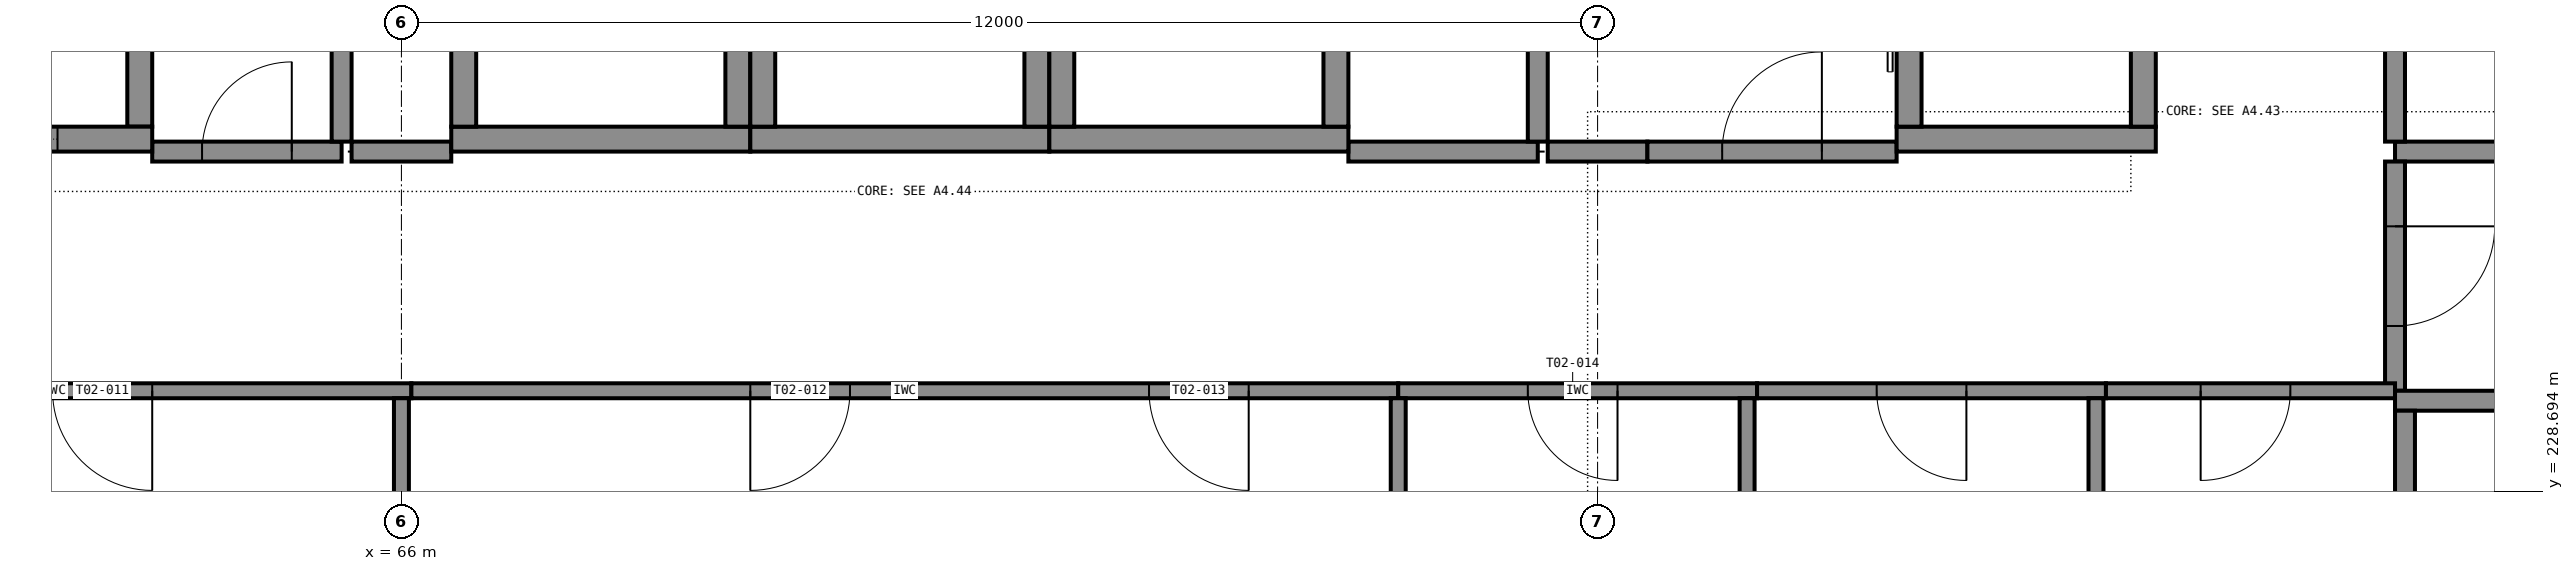
"""IFC4 building model, lengths in metres.
Left out: names, types, materials, properties, quantities, classifications, styles, units other than length and angle.
Written with IfcOpenShell. Run it as: python <this file> out.ifc"""

import sys

from ifc_helpers import new_model, si_unit, direction, frame, frame_2d, origin, place, context, subcontext, project, spatial, rectangle, extrude, element, fill, save


model = new_model("IFC4")
c1 = context("Model", 3, precision=1e-05, world=origin(), true_north=direction((0.0, 1.0)))
c2 = subcontext(c1, "Body", "Model", "MODEL_VIEW")
j1 = project(units=[si_unit("LENGTHUNIT", "METRE"), si_unit("PLANEANGLEUNIT", "RADIAN")], contexts=[c1])
p1 = place(None, origin())
s1 = spatial("IfcSite", under=j1, at=p1, CompositionType="ELEMENT")
p2 = place(p1, origin())
s2 = spatial("IfcBuilding", under=s1, at=p2, CompositionType="ELEMENT")
p3 = place(p2, frame((0.0, 0.0, 12.0)))
s3 = spatial("IfcBuildingStorey", under=s2, at=p3, CompositionType="ELEMENT", Elevation=12.0)
p4 = place(p3, frame((60.5, 232.225, 0.0), z_axis=(0.0, 0.0, 1.0), x_axis=(1.0, 0.0, 0.0)))
e1 = element("IfcWall", 1, at=p4, inside=s3, PredefinedType="SHEAR", context=c2, shape_type="SweptSolid", body=[
    extrude(rectangle(XDim=3.0, YDim=0.25, at=frame_2d((1.5, 0.0))), origin(), (0.0, 0.0, 1.0), 5.0),
])
p5 = place(p4, frame((0.95, 0.0, 0.0)))
e2 = element("IfcOpeningElement", 2, at=p5, cuts=e1, PredefinedType="OPENING", context=c2, shape_type="SweptSolid", body=[
    extrude(rectangle(XDim=1.1, YDim=2.1, at=frame_2d((0.55, 1.05))), frame((0.0, 0.135, 0.0), z_axis=(0.0, -1.0, 0.0), x_axis=(1.0, 0.0, 0.0)), (0.0, 0.0, 1.0), 0.27),
])
p6 = place(p3, frame((63.375, 232.35, 0.0), z_axis=(0.0, 0.0, 1.0), x_axis=(0.0, 1.0, 0.0)))
e3 = element("IfcWall", 3, at=p6, inside=s3, PredefinedType="SHEAR", context=c2, shape_type="SweptSolid", body=[
    extrude(rectangle(XDim=3.3, YDim=0.25, at=frame_2d((1.65, 0.0))), origin(), (0.0, 0.0, 1.0), 5.0),
])
p7 = place(p3, frame((66.5, 232.225, 0.0), z_axis=(0.0, 0.0, 1.0), x_axis=(1.0, 0.0, 0.0)))
e4 = element("IfcWall", 4, at=p7, inside=s3, PredefinedType="SHEAR", context=c2, shape_type="SweptSolid", body=[
    extrude(rectangle(XDim=3.0, YDim=0.25, at=frame_2d((1.5, 0.0))), origin(), (0.0, 0.0, 1.0), 5.0),
])
for number, where, z_axis, x_axis in (
    (5, (66.625, 232.35, 0.0), (0.0, 0.0, 1.0), (0.0, 1.0, 0.0)),
    (6, (69.375, 232.35, 0.0), (0.0, 0.0, 1.0), (0.0, 1.0, 0.0)),
):
    element("IfcWall", number, at=place(p3, frame(where, z_axis=z_axis, x_axis=x_axis)), inside=s3, PredefinedType="SHEAR", context=c2, shape_type="SweptSolid", body=[
        extrude(rectangle(XDim=3.3, YDim=0.25, at=frame_2d((1.65, 0.0))), origin(), (0.0, 0.0, 1.0), 5.0),
    ])
p8 = place(p3, frame((69.5, 232.225, 0.0), z_axis=(0.0, 0.0, 1.0), x_axis=(1.0, 0.0, 0.0)))
e7 = element("IfcWall", 7, at=p8, inside=s3, PredefinedType="SHEAR", context=c2, shape_type="SweptSolid", body=[
    extrude(rectangle(XDim=3.0, YDim=0.25, at=frame_2d((1.5, 0.0))), origin(), (0.0, 0.0, 1.0), 5.0),
])
for number, where, z_axis, x_axis in (
    (8, (69.625, 232.35, 0.0), (0.0, 0.0, 1.0), (0.0, 1.0, 0.0)),
    (9, (72.375, 232.35, 0.0), (0.0, 0.0, 1.0), (0.0, 1.0, 0.0)),
):
    element("IfcWall", number, at=place(p3, frame(where, z_axis=z_axis, x_axis=x_axis)), inside=s3, PredefinedType="SHEAR", context=c2, shape_type="SweptSolid", body=[
        extrude(rectangle(XDim=3.3, YDim=0.25, at=frame_2d((1.65, 0.0))), origin(), (0.0, 0.0, 1.0), 5.0),
    ])
p9 = place(p3, frame((72.5, 232.225, 0.0), z_axis=(0.0, 0.0, 1.0), x_axis=(1.0, 0.0, 0.0)))
e10 = element("IfcWall", 10, at=p9, inside=s3, PredefinedType="SHEAR", context=c2, shape_type="SweptSolid", body=[
    extrude(rectangle(XDim=3.0, YDim=0.25, at=frame_2d((1.5, 0.0))), origin(), (0.0, 0.0, 1.0), 5.0),
])
for number, where, z_axis, x_axis in (
    (11, (72.625, 232.35, 0.0), (0.0, 0.0, 1.0), (0.0, 1.0, 0.0)),
    (12, (75.375, 232.35, 0.0), (0.0, 0.0, 1.0), (0.0, 1.0, 0.0)),
):
    element("IfcWall", number, at=place(p3, frame(where, z_axis=z_axis, x_axis=x_axis)), inside=s3, PredefinedType="SHEAR", context=c2, shape_type="SweptSolid", body=[
        extrude(rectangle(XDim=3.3, YDim=0.25, at=frame_2d((1.65, 0.0))), origin(), (0.0, 0.0, 1.0), 5.0),
    ])
p10 = place(p3, frame((81.0, 232.225, 0.0), z_axis=(0.0, 0.0, 1.0), x_axis=(1.0, 0.0, 0.0)))
e13 = element("IfcWall", 13, at=p10, inside=s3, PredefinedType="SHEAR", context=c2, shape_type="SweptSolid", body=[
    extrude(rectangle(XDim=2.6, YDim=0.25, at=frame_2d((1.3, 0.0))), origin(), (0.0, 0.0, 1.0), 5.0),
])
p11 = place(p3, frame((81.125, 232.35, 0.0), z_axis=(0.0, 0.0, 1.0), x_axis=(0.0, 1.0, 0.0)))
e14 = element("IfcWall", 14, at=p11, inside=s3, PredefinedType="SHEAR", context=c2, shape_type="SweptSolid", body=[
    extrude(rectangle(XDim=3.3, YDim=0.25, at=frame_2d((1.65, 0.0))), origin(), (0.0, 0.0, 1.0), 5.0),
])
p12 = place(p11, frame((1.1, 0.0, 0.0)))
e15 = element("IfcOpeningElement", 15, at=p12, cuts=e14, PredefinedType="OPENING", context=c2, shape_type="SweptSolid", body=[
    extrude(rectangle(XDim=1.1, YDim=2.1, at=frame_2d((0.55, 1.05))), frame((0.0, 0.135, 0.0), z_axis=(0.0, -1.0, 0.0), x_axis=(1.0, 0.0, 0.0)), (0.0, 0.0, 1.0), 0.27),
])
p13 = place(p3, frame((83.475, 232.35, 0.0), z_axis=(0.0, 0.0, 1.0), x_axis=(0.0, 1.0, 0.0)))
e16 = element("IfcWall", 16, at=p13, inside=s3, PredefinedType="SHEAR", context=c2, shape_type="SweptSolid", body=[
    extrude(rectangle(XDim=3.3, YDim=0.25, at=frame_2d((1.65, 0.0))), origin(), (0.0, 0.0, 1.0), 5.0),
])
p14 = place(p3, frame((89.5, 229.6, 0.0), z_axis=(0.0, 0.0, 1.0), x_axis=(-1.0, 0.0, 0.0)))
e17 = element("IfcWall", 17, at=p14, inside=s3, PredefinedType="SHEAR", context=c2, shape_type="SweptSolid", body=[
    extrude(rectangle(XDim=3.5, YDim=0.2, at=frame_2d((1.75, 0.0))), origin(), (0.0, 0.0, 1.0), 5.0),
])
p15 = place(p14, frame((1.15, 0.0, 0.0)))
e18 = element("IfcOpeningElement", 18, at=p15, cuts=e17, PredefinedType="OPENING", context=c2, shape_type="SweptSolid", body=[
    extrude(rectangle(XDim=1.2, YDim=2.1, at=frame_2d((0.6, 1.05))), frame((0.0, 0.11, 0.0), z_axis=(0.0, -1.0, 0.0), x_axis=(1.0, 0.0, 0.0)), (0.0, 0.0, 1.0), 0.22),
])
p16 = place(p3, frame((86.1, 222.0, 0.0), z_axis=(0.0, 0.0, 1.0), x_axis=(0.0, 1.0, 0.0)))
e19 = element("IfcWall", 19, at=p16, inside=s3, PredefinedType="SHEAR", context=c2, shape_type="SweptSolid", body=[
    extrude(rectangle(XDim=7.5, YDim=0.2, at=frame_2d((3.75, 0.0))), origin(), (0.0, 0.0, 1.0), 5.0),
])
p17 = place(p3, frame((63.5, 232.1, 0.0), z_axis=(0.0, 0.0, 1.0), x_axis=(1.0, 0.0, 0.0)))
e20 = element("IfcWall", 20, at=p17, inside=s3, PredefinedType="PARTITIONING", context=c2, shape_type="SweptSolid", body=[
    extrude(rectangle(XDim=1.9, YDim=0.2, at=frame_2d((0.95, 0.0))), origin(), (0.0, 0.0, 1.0), 4.75),
])
p18 = place(p17, frame((0.5, 0.0, 0.0)))
e21 = element("IfcOpeningElement", 21, at=p18, cuts=e20, PredefinedType="OPENING", context=c2, shape_type="SweptSolid", body=[
    extrude(rectangle(XDim=0.9, YDim=2.1, at=frame_2d((0.45, 1.05))), frame((0.0, 0.11, 0.0), z_axis=(0.0, -1.0, 0.0), x_axis=(1.0, 0.0, 0.0)), (0.0, 0.0, 1.0), 0.22),
])
p19 = place(p3, frame((65.5, 232.1, 0.0), z_axis=(0.0, 0.0, 1.0), x_axis=(1.0, 0.0, 0.0)))
e22 = element("IfcWall", 22, at=p19, inside=s3, PredefinedType="PARTITIONING", context=c2, shape_type="SweptSolid", body=[
    extrude(rectangle(XDim=1.0, YDim=0.2, at=frame_2d((0.5, 0.0))), origin(), (0.0, 0.0, 1.0), 4.75),
])
p20 = place(p3, frame((75.5, 232.1, 0.0), z_axis=(0.0, 0.0, 1.0), x_axis=(1.0, 0.0, 0.0)))
e23 = element("IfcWall", 23, at=p20, inside=s3, PredefinedType="PARTITIONING", context=c2, shape_type="SweptSolid", body=[
    extrude(rectangle(XDim=1.9, YDim=0.2, at=frame_2d((0.95, 0.0))), origin(), (0.0, 0.0, 1.0), 4.75),
])
p21 = place(p3, frame((77.5, 232.1, 0.0), z_axis=(0.0, 0.0, 1.0), x_axis=(1.0, 0.0, 0.0)))
e24 = element("IfcWall", 24, at=p21, inside=s3, PredefinedType="PARTITIONING", context=c2, shape_type="SweptSolid", body=[
    extrude(rectangle(XDim=1.0, YDim=0.2, at=frame_2d((0.5, 0.0))), origin(), (0.0, 0.0, 1.0), 4.75),
])
p22 = place(p3, frame((78.5, 232.1, 0.0), z_axis=(0.0, 0.0, 1.0), x_axis=(1.0, 0.0, 0.0)))
e25 = element("IfcWall", 25, at=p22, inside=s3, PredefinedType="PARTITIONING", context=c2, shape_type="SweptSolid", body=[
    extrude(rectangle(XDim=2.5, YDim=0.2, at=frame_2d((1.25, 0.0))), origin(), (0.0, 0.0, 1.0), 4.75),
])
p23 = place(p22, frame((0.75, 0.0, 0.0)))
e26 = element("IfcOpeningElement", 26, at=p23, cuts=e25, PredefinedType="OPENING", context=c2, shape_type="SweptSolid", body=[
    extrude(rectangle(XDim=1.0, YDim=2.1, at=frame_2d((0.5, 1.05))), frame((0.0, 0.11, 0.0), z_axis=(0.0, -1.0, 0.0), x_axis=(1.0, 0.0, 0.0)), (0.0, 0.0, 1.0), 0.22),
])
p24 = place(p3, frame((86.0, 232.1, 0.0), z_axis=(0.0, 0.0, 1.0), x_axis=(1.0, 0.0, 0.0)))
e27 = element("IfcWall", 27, at=p24, inside=s3, PredefinedType="PARTITIONING", context=c2, shape_type="SweptSolid", body=[
    extrude(rectangle(XDim=3.65, YDim=0.2, at=frame_2d((1.825, 0.0))), origin(), (0.0, 0.0, 1.0), 4.75),
])
for number, where, z_axis, x_axis in (
    (28, (65.4, 232.2, 0.0), (0.0, 0.0, 1.0), (0.0, 1.0, 0.0)),
    (29, (77.4, 232.2, 0.0), (0.0, 0.0, 1.0), (0.0, 1.0, 0.0)),
):
    element("IfcWall", number, at=place(p3, frame(where, z_axis=z_axis, x_axis=x_axis)), inside=s3, PredefinedType="PARTITIONING", context=c2, shape_type="SweptSolid", body=[
        extrude(rectangle(XDim=3.6, YDim=0.2, at=frame_2d((1.8, 0.0))), origin(), (0.0, 0.0, 1.0), 4.75),
    ])
p25 = place(p3, frame((86.0, 235.8, 0.0), z_axis=(0.0, 0.0, 1.0), x_axis=(0.0, -1.0, 0.0)))
e30 = element("IfcWall", 30, at=p25, inside=s3, PredefinedType="PARTITIONING", context=c2, shape_type="SweptSolid", body=[
    extrude(rectangle(XDim=3.6, YDim=0.2, at=frame_2d((1.8, 0.0))), origin(), (0.0, 0.0, 1.0), 4.75),
])
p26 = place(p25, frame((1.35, 0.0, 0.0)))
e31 = element("IfcOpeningElement", 31, at=p26, cuts=e30, PredefinedType="OPENING", context=c2, shape_type="SweptSolid", body=[
    extrude(rectangle(XDim=0.9, YDim=2.1, at=frame_2d((0.45, 1.05))), frame((0.0, 0.11, 0.0), z_axis=(0.0, -1.0, 0.0), x_axis=(1.0, 0.0, 0.0)), (0.0, 0.0, 1.0), 0.22),
])
p27 = place(p3, frame((86.0, 232.0, 0.0), z_axis=(0.0, 0.0, 1.0), x_axis=(0.0, -1.0, 0.0)))
e32 = element("IfcWall", 32, at=p27, inside=s3, PredefinedType="PARTITIONING", context=c2, shape_type="SweptSolid", body=[
    extrude(rectangle(XDim=2.3, YDim=0.2, at=frame_2d((1.15, 0.0))), origin(), (0.0, 0.0, 1.0), 4.75),
])
p28 = place(p27, frame((0.65, 0.0, 0.0)))
e33 = element("IfcOpeningElement", 33, at=p28, cuts=e32, PredefinedType="OPENING", context=c2, shape_type="SweptSolid", body=[
    extrude(rectangle(XDim=1.0, YDim=2.1, at=frame_2d((0.5, 1.05))), frame((0.0, 0.11, 0.0), z_axis=(0.0, -1.0, 0.0), x_axis=(1.0, 0.0, 0.0)), (0.0, 0.0, 1.0), 0.22),
])
p29 = place(p3, frame((66.1, 229.7, 0.0), z_axis=(0.0, 0.0, 1.0), x_axis=(-1.0, 0.0, 0.0)))
e34 = element("IfcWall", 34, at=p29, inside=s3, PredefinedType="PARTITIONING", context=c2, shape_type="SweptSolid", body=[
    extrude(rectangle(XDim=12.0, YDim=0.15, at=frame_2d((6.0, 0.0))), origin(), (0.0, 0.0, 1.0), 4.75),
])
p30 = place(p29, frame((7.6, 0.0, 0.0)))
e35 = element("IfcOpeningElement", 35, at=p30, cuts=e34, PredefinedType="OPENING", context=c2, shape_type="SweptSolid", body=[
    extrude(rectangle(XDim=1.0, YDim=2.1, at=frame_2d((0.5, 1.05))), frame((0.0, 0.085, 0.0), z_axis=(0.0, -1.0, 0.0), x_axis=(1.0, 0.0, 0.0)), (0.0, 0.0, 1.0), 0.17),
])
p31 = place(p29, frame((2.6, 0.0, 0.0)))
e36 = element("IfcOpeningElement", 36, at=p31, cuts=e34, PredefinedType="OPENING", context=c2, shape_type="SweptSolid", body=[
    extrude(rectangle(XDim=1.0, YDim=2.1, at=frame_2d((0.5, 1.05))), frame((0.0, 0.085, 0.0), z_axis=(0.0, -1.0, 0.0), x_axis=(1.0, 0.0, 0.0)), (0.0, 0.0, 1.0), 0.17),
])
p32 = place(p3, frame((76.0, 229.7, 0.0), z_axis=(0.0, 0.0, 1.0), x_axis=(-1.0, 0.0, 0.0)))
e37 = element("IfcWall", 37, at=p32, inside=s3, PredefinedType="PARTITIONING", context=c2, shape_type="SweptSolid", body=[
    extrude(rectangle(XDim=9.9, YDim=0.15, at=frame_2d((4.95, 0.0))), origin(), (0.0, 0.0, 1.0), 4.75),
])
p33 = place(p32, frame((5.5, 0.0, 0.0)))
e38 = element("IfcOpeningElement", 38, at=p33, cuts=e37, PredefinedType="OPENING", context=c2, shape_type="SweptSolid", body=[
    extrude(rectangle(XDim=1.0, YDim=2.1, at=frame_2d((0.5, 1.05))), frame((0.0, 0.085, 0.0), z_axis=(0.0, -1.0, 0.0), x_axis=(1.0, 0.0, 0.0)), (0.0, 0.0, 1.0), 0.17),
])
p34 = place(p32, frame((1.5, 0.0, 0.0)))
e39 = element("IfcOpeningElement", 39, at=p34, cuts=e37, PredefinedType="OPENING", context=c2, shape_type="SweptSolid", body=[
    extrude(rectangle(XDim=1.0, YDim=2.1, at=frame_2d((0.5, 1.05))), frame((0.0, 0.085, 0.0), z_axis=(0.0, -1.0, 0.0), x_axis=(1.0, 0.0, 0.0)), (0.0, 0.0, 1.0), 0.17),
])
p35 = place(p3, frame((66.0, 222.5, 0.0), z_axis=(0.0, 0.0, 1.0), x_axis=(0.0, 1.0, 0.0)))
e40 = element("IfcWall", 40, at=p35, inside=s3, PredefinedType="PARTITIONING", context=c2, shape_type="SweptSolid", body=[
    extrude(rectangle(XDim=7.125, YDim=0.15, at=frame_2d((3.562, 0.0))), origin(), (0.0, 0.0, 1.0), 3.75),
])
p36 = place(p3, frame((79.6, 229.7, 0.0), z_axis=(0.0, 0.0, 1.0), x_axis=(-1.0, 0.0, 0.0)))
e41 = element("IfcWall", 41, at=p36, inside=s3, PredefinedType="PARTITIONING", context=c2, shape_type="SweptSolid", body=[
    extrude(rectangle(XDim=3.6, YDim=0.15, at=frame_2d((1.8, 0.0))), origin(), (0.0, 0.0, 1.0), 4.75),
])
p37 = place(p36, frame((1.4, 0.0, 0.0)))
e42 = element("IfcOpeningElement", 42, at=p37, cuts=e41, PredefinedType="OPENING", context=c2, shape_type="SweptSolid", body=[
    extrude(rectangle(XDim=0.9, YDim=2.1, at=frame_2d((0.45, 1.05))), frame((0.0, 0.085, 0.0), z_axis=(0.0, -1.0, 0.0), x_axis=(1.0, 0.0, 0.0)), (0.0, 0.0, 1.0), 0.17),
])
p38 = place(p3, frame((76.0, 222.4, 0.0), z_axis=(0.0, 0.0, 1.0), x_axis=(0.0, 1.0, 0.0)))
e43 = element("IfcWall", 43, at=p38, inside=s3, PredefinedType="PARTITIONING", context=c2, shape_type="SweptSolid", body=[
    extrude(rectangle(XDim=7.225, YDim=0.15, at=frame_2d((3.613, 0.0))), origin(), (0.0, 0.0, 1.0), 4.75),
])
p39 = place(p3, frame((83.1, 229.7, 0.0), z_axis=(0.0, 0.0, 1.0), x_axis=(-1.0, 0.0, 0.0)))
e44 = element("IfcWall", 44, at=p39, inside=s3, PredefinedType="PARTITIONING", context=c2, shape_type="SweptSolid", body=[
    extrude(rectangle(XDim=3.5, YDim=0.15, at=frame_2d((1.75, 0.0))), origin(), (0.0, 0.0, 1.0), 4.75),
])
p40 = place(p39, frame((1.4, 0.0, 0.0)))
e45 = element("IfcOpeningElement", 45, at=p40, cuts=e44, PredefinedType="OPENING", context=c2, shape_type="SweptSolid", body=[
    extrude(rectangle(XDim=0.9, YDim=2.1, at=frame_2d((0.45, 1.05))), frame((0.0, 0.085, 0.0), z_axis=(0.0, -1.0, 0.0), x_axis=(1.0, 0.0, 0.0)), (0.0, 0.0, 1.0), 0.17),
])
p41 = place(p3, frame((79.5, 222.4, 0.0), z_axis=(0.0, 0.0, 1.0), x_axis=(0.0, 1.0, 0.0)))
e46 = element("IfcWall", 46, at=p41, inside=s3, PredefinedType="PARTITIONING", context=c2, shape_type="SweptSolid", body=[
    extrude(rectangle(XDim=7.225, YDim=0.15, at=frame_2d((3.613, 0.0))), origin(), (0.0, 0.0, 1.0), 4.75),
])
p42 = place(p3, frame((86.0, 229.7, 0.0), z_axis=(0.0, 0.0, 1.0), x_axis=(-1.0, 0.0, 0.0)))
e47 = element("IfcWall", 47, at=p42, inside=s3, PredefinedType="PARTITIONING", context=c2, shape_type="SweptSolid", body=[
    extrude(rectangle(XDim=2.9, YDim=0.15, at=frame_2d((1.45, 0.0))), origin(), (0.0, 0.0, 1.0), 4.75),
])
p43 = place(p42, frame((1.05, 0.0, 0.0)))
e48 = element("IfcOpeningElement", 48, at=p43, cuts=e47, PredefinedType="OPENING", context=c2, shape_type="SweptSolid", body=[
    extrude(rectangle(XDim=0.9, YDim=2.1, at=frame_2d((0.45, 1.05))), frame((0.0, 0.085, 0.0), z_axis=(0.0, -1.0, 0.0), x_axis=(1.0, 0.0, 0.0)), (0.0, 0.0, 1.0), 0.17),
])
p44 = place(p3, frame((83.0, 222.4, 0.0), z_axis=(0.0, 0.0, 1.0), x_axis=(0.0, 1.0, 0.0)))
e49 = element("IfcWall", 49, at=p44, inside=s3, PredefinedType="PARTITIONING", context=c2, shape_type="SweptSolid", body=[
    extrude(rectangle(XDim=7.225, YDim=0.15, at=frame_2d((3.613, 0.0))), origin(), (0.0, 0.0, 1.0), 4.75),
])
p45 = place(p18, origin())
e50 = element("IfcDoor", 50, at=p45, inside=s3, OperationType="SINGLE_SWING_RIGHT", PredefinedType="DOOR", context=c2, shape_type="SweptSolid", body=[
    extrude(rectangle(XDim=0.9, YDim=2.1, at=frame_2d((0.45, 1.05))), frame((0.0, 0.025, 0.0), z_axis=(0.0, -1.0, 0.0), x_axis=(1.0, 0.0, 0.0)), (0.0, 0.0, 1.0), 0.05),
])
fill(e21, e50)
p46 = place(p23, origin())
e51 = element("IfcDoor", 51, at=p46, inside=s3, OperationType="SINGLE_SWING_RIGHT", PredefinedType="DOOR", context=c2, shape_type="SweptSolid", body=[
    extrude(rectangle(XDim=1.0, YDim=2.1, at=frame_2d((0.5, 1.05))), frame((0.0, 0.025, 0.0), z_axis=(0.0, -1.0, 0.0), x_axis=(1.0, 0.0, 0.0)), (0.0, 0.0, 1.0), 0.05),
])
fill(e26, e51)
p47 = place(p28, origin())
e52 = element("IfcDoor", 52, at=p47, inside=s3, OperationType="SINGLE_SWING_LEFT", PredefinedType="DOOR", context=c2, shape_type="SweptSolid", body=[
    extrude(rectangle(XDim=1.0, YDim=2.1, at=frame_2d((0.5, 1.05))), frame((0.0, 0.025, 0.0), z_axis=(0.0, -1.0, 0.0), x_axis=(1.0, 0.0, 0.0)), (0.0, 0.0, 1.0), 0.05),
])
fill(e33, e52)
p48 = place(p31, origin())
e53 = element("IfcDoor", 53, at=p48, inside=s3, OperationType="SINGLE_SWING_LEFT", PredefinedType="DOOR", context=c2, shape_type="SweptSolid", body=[
    extrude(rectangle(XDim=1.0, YDim=2.1, at=frame_2d((0.5, 1.05))), frame((0.0, 0.025, 0.0), z_axis=(0.0, -1.0, 0.0), x_axis=(1.0, 0.0, 0.0)), (0.0, 0.0, 1.0), 0.05),
])
fill(e36, e53)
p49 = place(p33, origin())
e54 = element("IfcDoor", 54, at=p49, inside=s3, OperationType="SINGLE_SWING_RIGHT", PredefinedType="DOOR", context=c2, shape_type="SweptSolid", body=[
    extrude(rectangle(XDim=1.0, YDim=2.1, at=frame_2d((0.5, 1.05))), frame((0.0, 0.025, 0.0), z_axis=(0.0, -1.0, 0.0), x_axis=(1.0, 0.0, 0.0)), (0.0, 0.0, 1.0), 0.05),
])
fill(e38, e54)
p50 = place(p34, origin())
e55 = element("IfcDoor", 55, at=p50, inside=s3, OperationType="SINGLE_SWING_LEFT", PredefinedType="DOOR", context=c2, shape_type="SweptSolid", body=[
    extrude(rectangle(XDim=1.0, YDim=2.1, at=frame_2d((0.5, 1.05))), frame((0.0, 0.025, 0.0), z_axis=(0.0, -1.0, 0.0), x_axis=(1.0, 0.0, 0.0)), (0.0, 0.0, 1.0), 0.05),
])
fill(e39, e55)
p51 = place(p37, origin())
e56 = element("IfcDoor", 56, at=p51, inside=s3, OperationType="SINGLE_SWING_LEFT", PredefinedType="DOOR", context=c2, shape_type="SweptSolid", body=[
    extrude(rectangle(XDim=0.9, YDim=2.1, at=frame_2d((0.45, 1.05))), frame((0.0, 0.025, 0.0), z_axis=(0.0, -1.0, 0.0), x_axis=(1.0, 0.0, 0.0)), (0.0, 0.0, 1.0), 0.05),
])
fill(e42, e56)
p52 = place(p40, origin())
e57 = element("IfcDoor", 57, at=p52, inside=s3, OperationType="SINGLE_SWING_LEFT", PredefinedType="DOOR", context=c2, shape_type="SweptSolid", body=[
    extrude(rectangle(XDim=0.9, YDim=2.1, at=frame_2d((0.45, 1.05))), frame((0.0, 0.025, 0.0), z_axis=(0.0, -1.0, 0.0), x_axis=(1.0, 0.0, 0.0)), (0.0, 0.0, 1.0), 0.05),
])
fill(e45, e57)
p53 = place(p43, origin())
e58 = element("IfcDoor", 58, at=p53, inside=s3, OperationType="SINGLE_SWING_RIGHT", PredefinedType="DOOR", context=c2, shape_type="SweptSolid", body=[
    extrude(rectangle(XDim=0.9, YDim=2.1, at=frame_2d((0.45, 1.05))), frame((0.0, 0.025, 0.0), z_axis=(0.0, -1.0, 0.0), x_axis=(1.0, 0.0, 0.0)), (0.0, 0.0, 1.0), 0.05),
])
fill(e48, e58)
p54 = place(p5, origin())
e59 = element("IfcDoor", 59, at=p54, inside=s3, OperationType="SLIDING_TO_LEFT", PredefinedType="DOOR", context=c2, shape_type="SweptSolid", body=[
    extrude(rectangle(XDim=1.1, YDim=2.1, at=frame_2d((0.55, 1.05))), frame((0.0, 0.025, 0.0), z_axis=(0.0, -1.0, 0.0), x_axis=(1.0, 0.0, 0.0)), (0.0, 0.0, 1.0), 0.05),
])
fill(e2, e59)
save(model, sys.argv[1])
